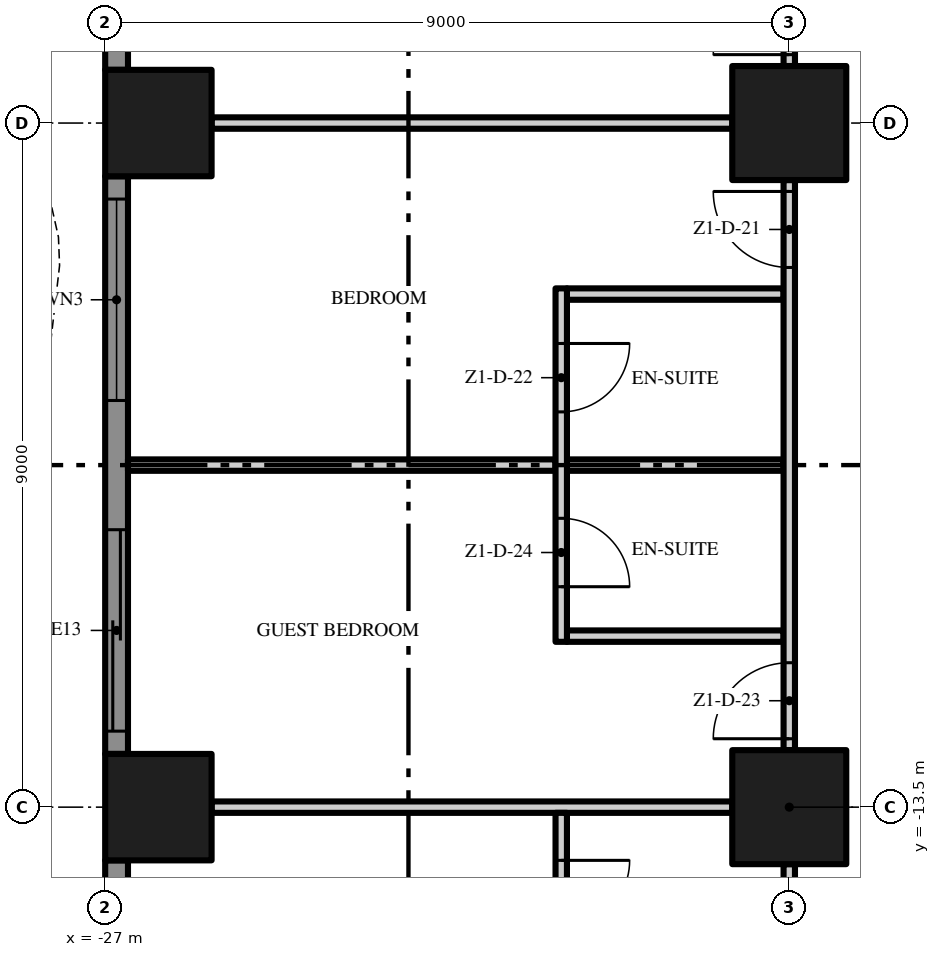
"""IFC4 building model, lengths in metres.
Left out: names, types, materials, properties, quantities, classifications, styles, units other than length and angle.
Written with IfcOpenShell. Run it as: python <this file> out.ifc"""

import sys

from ifc_helpers import new_model, si_unit, direction, frame, frame_2d, origin, origin_2d, place, context, subcontext, project, spatial, polyline, rectangle, outline, extrude, element, fill, save


model = new_model("IFC4")
c1 = context("Model", 3, precision=1e-05, world=origin(), true_north=direction((0.0, 1.0)))
c2 = subcontext(c1, "Body", "Model", "MODEL_VIEW")
j1 = project(units=[si_unit("LENGTHUNIT", "METRE"), si_unit("PLANEANGLEUNIT", "RADIAN")], contexts=[c1])
p1 = place(None, origin())
s1 = spatial("IfcSite", under=j1, at=p1, CompositionType="ELEMENT")
p2 = place(p1, origin())
s2 = spatial("IfcBuilding", under=s1, at=p2, CompositionType="ELEMENT")
p3 = place(p2, frame((0.0, 0.0, 49.2)))
s3 = spatial("IfcBuildingStorey", under=s2, at=p3, CompositionType="ELEMENT", Elevation=49.2)
for number, where, z_axis, x_axis in (
    (1, (-18.0, -13.5, 0.0), (0.0, 0.0, 1.0), (1.0, 0.0, 0.0)),
    (2, (-18.0, -4.5, 0.0), (0.0, 0.0, 1.0), (1.0, 0.0, 0.0)),
):
    element("IfcColumn", number, at=place(p3, frame(where, z_axis=z_axis, x_axis=x_axis)), inside=s3, PredefinedType="COLUMN", context=c2, shape_type="SweptSolid", body=[
        extrude(rectangle(XDim=1.5, YDim=1.5, at=origin_2d()), origin(), (0.0, 0.0, 1.0), 3.5),
    ])
for number, where, z_axis, x_axis in (
    (3, (-26.3, -13.5, 0.0), (0.0, 0.0, 1.0), (1.0, 0.0, 0.0)),
    (4, (-26.3, -4.5, 0.0), (0.0, 0.0, 1.0), (1.0, 0.0, 0.0)),
):
    element("IfcColumn", number, at=place(p3, frame(where, z_axis=z_axis, x_axis=x_axis)), inside=s3, PredefinedType="COLUMN", context=c2, shape_type="SweptSolid", body=[
        extrude(rectangle(XDim=1.4, YDim=1.4, at=origin_2d()), origin(), (0.0, 0.0, 1.0), 3.5),
    ])
p4 = place(p3, frame((-26.85, -3.8, 0.0), z_axis=(0.0, 0.0, 1.0), x_axis=(0.0, 1.0, 0.0)))
e5 = element("IfcWall", 5, at=p4, inside=s3, PredefinedType="SOLIDWALL", context=c2, shape_type="SweptSolid", body=[
    extrude(rectangle(XDim=7.6, YDim=0.3, at=frame_2d((3.8, 0.0))), origin(), (0.0, 0.0, 1.0), 3.5),
])
p5 = place(p4, frame((4.65, 0.0, 0.0)))
e6 = element("IfcOpeningElement", 6, at=p5, cuts=e5, PredefinedType="OPENING", context=c2, shape_type="SweptSolid", body=[
    extrude(rectangle(XDim=2.65, YDim=2.4, at=frame_2d((1.325, 1.2))), frame((0.0, 0.16, 0.0), z_axis=(0.0, -1.0, 0.0), x_axis=(1.0, 0.0, 0.0)), (0.0, 0.0, 1.0), 0.32),
])
p6 = place(p4, frame((0.3, 0.0, 0.45)))
e7 = element("IfcOpeningElement", 7, at=p6, cuts=e5, PredefinedType="OPENING", context=c2, shape_type="SweptSolid", body=[
    extrude(rectangle(XDim=2.65, YDim=2.65, at=frame_2d((1.325, 1.325))), frame((0.0, 0.16, 0.0), z_axis=(0.0, -1.0, 0.0), x_axis=(1.0, 0.0, 0.0)), (0.0, 0.0, 1.0), 0.32),
])
p7 = place(p3, frame((-26.85, -12.8, 0.0), z_axis=(0.0, 0.0, 1.0), x_axis=(0.0, 1.0, 0.0)))
e8 = element("IfcWall", 8, at=p7, inside=s3, PredefinedType="SOLIDWALL", context=c2, shape_type="SweptSolid", body=[
    extrude(rectangle(XDim=7.6, YDim=0.3, at=frame_2d((3.8, 0.0))), origin(), (0.0, 0.0, 1.0), 3.5),
])
p8 = place(p7, frame((4.65, 0.0, 0.45)))
e9 = element("IfcOpeningElement", 9, at=p8, cuts=e8, PredefinedType="OPENING", context=c2, shape_type="SweptSolid", body=[
    extrude(rectangle(XDim=2.65, YDim=2.65, at=frame_2d((1.325, 1.325))), frame((0.0, 0.16, 0.0), z_axis=(0.0, -1.0, 0.0), x_axis=(1.0, 0.0, 0.0)), (0.0, 0.0, 1.0), 0.32),
])
p9 = place(p7, frame((0.3, 0.0, 0.0)))
e10 = element("IfcOpeningElement", 10, at=p9, cuts=e8, PredefinedType="OPENING", context=c2, shape_type="SweptSolid", body=[
    extrude(rectangle(XDim=2.65, YDim=2.4, at=frame_2d((1.325, 1.2))), frame((0.0, 0.16, 0.0), z_axis=(0.0, -1.0, 0.0), x_axis=(1.0, 0.0, 0.0)), (0.0, 0.0, 1.0), 0.32),
])
p10 = place(p3, frame((-26.85, -18.0, 0.0), z_axis=(0.0, 0.0, 1.0), x_axis=(0.0, 1.0, 0.0)))
e11 = element("IfcWall", 11, at=p10, inside=s3, PredefinedType="SOLIDWALL", context=c2, shape_type="SweptSolid", body=[
    extrude(rectangle(XDim=3.8, YDim=0.3, at=frame_2d((1.9, 0.0))), origin(), (0.0, 0.0, 1.0), 3.5),
])
p11 = place(p10, frame((0.85, 0.0, 0.0)))
e12 = element("IfcOpeningElement", 12, at=p11, cuts=e11, PredefinedType="OPENING", context=c2, shape_type="SweptSolid", body=[
    extrude(rectangle(XDim=2.65, YDim=2.4, at=frame_2d((1.325, 1.2))), frame((0.0, 0.16, 0.0), z_axis=(0.0, -1.0, 0.0), x_axis=(1.0, 0.0, 0.0)), (0.0, 0.0, 1.0), 0.32),
])
p12 = place(p3, origin())
e13 = element("IfcWall", 13, at=p12, inside=s3, PredefinedType="USERDEFINED", context=c2, shape_type="SweptSolid", body=[
    extrude(outline(polyline([(-29.649, 18.0), (-29.985, 16.5), (-30.0, 16.125), (-29.869, 15.0), (-29.345, 13.5), (-28.612, 12.0), (-27.951, 10.5), (-27.615, 9.0), (-27.6, 8.625), (-27.731, 7.5), (-28.255, 6.0), (-28.988, 4.5), (-29.649, 3.0), (-29.985, 1.5), (-30.0, 1.125), (-29.869, 0.0), (-29.345, -1.5), (-28.612, -3.0), (-27.951, -4.5), (-27.615, -6.0), (-27.6, -6.375), (-27.731, -7.5), (-28.255, -9.0), (-28.988, -10.5), (-29.649, -12.0), (-29.985, -13.5), (-30.0, -13.875), (-29.869, -15.0), (-29.345, -16.5), (-28.612, -18.0), (-28.388, -17.89), (-29.114, -16.404), (-29.624, -14.944), (-29.749, -13.865), (-29.736, -13.533), (-29.41, -12.079), (-28.761, -10.605), (-28.024, -9.096), (-27.486, -7.556), (-27.349, -6.385), (-27.366, -5.967), (-27.713, -4.421), (-28.385, -2.895), (-29.114, -1.404), (-29.624, 0.056), (-29.749, 1.135), (-29.736, 1.467), (-29.41, 2.921), (-28.761, 4.395), (-28.024, 5.904), (-27.486, 7.444), (-27.349, 8.615), (-27.366, 9.033), (-27.713, 10.579), (-28.385, 12.105), (-29.114, 13.596), (-29.624, 15.056), (-29.749, 16.135), (-29.736, 16.467), (-29.405, 17.945), (-29.649, 18.0)])), origin(), (0.0, 0.0, 1.0), 0.9),
])
p13 = place(p3, frame((-25.6, -13.5, 0.0), z_axis=(0.0, 0.0, 1.0), x_axis=(1.0, 0.0, 0.0)))
e14 = element("IfcWall", 14, at=p13, inside=s3, PredefinedType="PARTITIONING", context=c2, shape_type="SweptSolid", body=[
    extrude(rectangle(XDim=6.85, YDim=0.15, at=frame_2d((3.425, 0.0))), origin(), (0.0, 0.0, 1.0), 3.5),
])
p14 = place(p3, frame((-20.925, -11.25, 0.0), z_axis=(0.0, 0.0, 1.0), x_axis=(1.0, 0.0, 0.0)))
e15 = element("IfcWall", 15, at=p14, inside=s3, PredefinedType="PARTITIONING", context=c2, shape_type="SweptSolid", body=[
    extrude(rectangle(XDim=2.85, YDim=0.15, at=frame_2d((1.425, 0.0))), origin(), (0.0, 0.0, 1.0), 3.5),
])
p15 = place(p3, frame((-26.7, -9.0, 0.0), z_axis=(0.0, 0.0, 1.0), x_axis=(1.0, 0.0, 0.0)))
e16 = element("IfcWall", 16, at=p15, inside=s3, PredefinedType="PARTITIONING", context=c2, shape_type="SweptSolid", body=[
    extrude(rectangle(XDim=5.625, YDim=0.15, at=frame_2d((2.812, 0.0))), origin(), (0.0, 0.0, 1.0), 3.5),
])
for number, where, z_axis, x_axis in (
    (17, (-20.925, -9.0, 0.0), (0.0, 0.0, 1.0), (1.0, 0.0, 0.0)),
    (18, (-20.925, -6.75, 0.0), (0.0, 0.0, 1.0), (1.0, 0.0, 0.0)),
):
    element("IfcWall", number, at=place(p3, frame(where, z_axis=z_axis, x_axis=x_axis)), inside=s3, PredefinedType="PARTITIONING", context=c2, shape_type="SweptSolid", body=[
        extrude(rectangle(XDim=2.85, YDim=0.15, at=frame_2d((1.425, 0.0))), origin(), (0.0, 0.0, 1.0), 3.5),
    ])
p16 = place(p3, frame((-25.6, -4.5, 0.0), z_axis=(0.0, 0.0, 1.0), x_axis=(1.0, 0.0, 0.0)))
e19 = element("IfcWall", 19, at=p16, inside=s3, PredefinedType="PARTITIONING", context=c2, shape_type="SweptSolid", body=[
    extrude(rectangle(XDim=6.85, YDim=0.15, at=frame_2d((3.425, 0.0))), origin(), (0.0, 0.0, 1.0), 3.5),
])
p17 = place(p3, frame((-21.0, -13.575, 0.0), z_axis=(0.0, 0.0, 1.0), x_axis=(0.0, -1.0, 0.0)))
e20 = element("IfcWall", 20, at=p17, inside=s3, PredefinedType="PARTITIONING", context=c2, shape_type="SweptSolid", body=[
    extrude(rectangle(XDim=2.25, YDim=0.15, at=frame_2d((1.125, 0.0))), origin(), (0.0, 0.0, 1.0), 3.5),
])
p18 = place(p17, frame((0.625, 0.0, 0.0)))
e21 = element("IfcOpeningElement", 21, at=p18, cuts=e20, PredefinedType="OPENING", context=c2, shape_type="SweptSolid", body=[
    extrude(rectangle(XDim=0.9, YDim=2.1, at=frame_2d((0.45, 1.05))), frame((0.0, 0.085, 0.0), z_axis=(0.0, -1.0, 0.0), x_axis=(1.0, 0.0, 0.0)), (0.0, 0.0, 1.0), 0.17),
])
p19 = place(p3, frame((-21.0, -6.675, 0.0), z_axis=(0.0, 0.0, 1.0), x_axis=(0.0, -1.0, 0.0)))
e22 = element("IfcWall", 22, at=p19, inside=s3, PredefinedType="PARTITIONING", context=c2, shape_type="SweptSolid", body=[
    extrude(rectangle(XDim=4.65, YDim=0.15, at=frame_2d((2.325, 0.0))), origin(), (0.0, 0.0, 1.0), 3.5),
])
p20 = place(p19, frame((0.725, 0.0, 0.0)))
e23 = element("IfcOpeningElement", 23, at=p20, cuts=e22, PredefinedType="OPENING", context=c2, shape_type="SweptSolid", body=[
    extrude(rectangle(XDim=0.9, YDim=2.1, at=frame_2d((0.45, 1.05))), frame((0.0, 0.085, 0.0), z_axis=(0.0, -1.0, 0.0), x_axis=(1.0, 0.0, 0.0)), (0.0, 0.0, 1.0), 0.17),
])
p21 = place(p19, frame((3.025, 0.0, 0.0)))
e24 = element("IfcOpeningElement", 24, at=p21, cuts=e22, PredefinedType="OPENING", context=c2, shape_type="SweptSolid", body=[
    extrude(rectangle(XDim=0.9, YDim=2.1, at=frame_2d((0.45, 1.05))), frame((0.0, 0.085, 0.0), z_axis=(0.0, -1.0, 0.0), x_axis=(1.0, 0.0, 0.0)), (0.0, 0.0, 1.0), 0.17),
])
p22 = place(p3, frame((-18.0, -21.1, 0.0), z_axis=(0.0, 0.0, 1.0), x_axis=(0.0, 1.0, 0.0)))
e25 = element("IfcWall", 25, at=p22, inside=s3, PredefinedType="PARTITIONING", context=c2, shape_type="SweptSolid", body=[
    extrude(rectangle(XDim=6.85, YDim=0.15, at=frame_2d((3.425, 0.0))), origin(), (0.0, 0.0, 1.0), 3.5),
])
p23 = place(p22, frame((1.1, 0.0, 0.0)))
e26 = element("IfcOpeningElement", 26, at=p23, cuts=e25, PredefinedType="OPENING", context=c2, shape_type="SweptSolid", body=[
    extrude(rectangle(XDim=1.8, YDim=2.4, at=frame_2d((0.9, 1.2))), frame((0.0, 0.085, 0.0), z_axis=(0.0, -1.0, 0.0), x_axis=(1.0, 0.0, 0.0)), (0.0, 0.0, 1.0), 0.17),
])
p24 = place(p3, frame((-18.0, -12.75, 0.0), z_axis=(0.0, 0.0, 1.0), x_axis=(0.0, 1.0, 0.0)))
e27 = element("IfcWall", 27, at=p24, inside=s3, PredefinedType="PARTITIONING", context=c2, shape_type="SweptSolid", body=[
    extrude(rectangle(XDim=7.5, YDim=0.15, at=frame_2d((3.75, 0.0))), origin(), (0.0, 0.0, 1.0), 3.5),
])
p25 = place(p24, frame((6.35, 0.0, 0.0)))
e28 = element("IfcOpeningElement", 28, at=p25, cuts=e27, PredefinedType="OPENING", context=c2, shape_type="SweptSolid", body=[
    extrude(rectangle(XDim=1.0, YDim=2.4, at=frame_2d((0.5, 1.2))), frame((0.0, 0.085, 0.0), z_axis=(0.0, -1.0, 0.0), x_axis=(1.0, 0.0, 0.0)), (0.0, 0.0, 1.0), 0.17),
])
p26 = place(p24, frame((0.15, 0.0, 0.0)))
e29 = element("IfcOpeningElement", 29, at=p26, cuts=e27, PredefinedType="OPENING", context=c2, shape_type="SweptSolid", body=[
    extrude(rectangle(XDim=1.0, YDim=2.4, at=frame_2d((0.5, 1.2))), frame((0.0, 0.085, 0.0), z_axis=(0.0, -1.0, 0.0), x_axis=(1.0, 0.0, 0.0)), (0.0, 0.0, 1.0), 0.17),
])
p27 = place(p3, frame((-18.0, -3.75, 0.0), z_axis=(0.0, 0.0, 1.0), x_axis=(0.0, 1.0, 0.0)))
e30 = element("IfcWall", 30, at=p27, inside=s3, PredefinedType="PARTITIONING", context=c2, shape_type="SweptSolid", body=[
    extrude(rectangle(XDim=3.65, YDim=0.15, at=frame_2d((1.825, 0.0))), origin(), (0.0, 0.0, 1.0), 3.5),
])
p28 = place(p27, frame((0.15, 0.0, 0.0)))
e31 = element("IfcOpeningElement", 31, at=p28, cuts=e30, PredefinedType="OPENING", context=c2, shape_type="SweptSolid", body=[
    extrude(rectangle(XDim=1.0, YDim=2.4, at=frame_2d((0.5, 1.2))), frame((0.0, 0.085, 0.0), z_axis=(0.0, -1.0, 0.0), x_axis=(1.0, 0.0, 0.0)), (0.0, 0.0, 1.0), 0.17),
])
p29 = place(p8, origin())
e32 = element("IfcWindow", 32, at=p29, inside=s3, PartitioningType="SINGLE_PANEL", PredefinedType="WINDOW", context=c2, shape_type="SweptSolid", body=[
    extrude(rectangle(XDim=2.65, YDim=2.65, at=frame_2d((1.325, 1.325))), frame((0.0, 0.03, 0.0), z_axis=(0.0, -1.0, 0.0), x_axis=(1.0, 0.0, 0.0)), (0.0, 0.0, 1.0), 0.06),
])
fill(e9, e32)
p30 = place(p9, origin())
e33 = element("IfcDoor", 33, at=p30, inside=s3, OperationType="SINGLE_SWING_LEFT", PredefinedType="DOOR", context=c2, shape_type="SweptSolid", body=[
    extrude(rectangle(XDim=2.65, YDim=2.4, at=frame_2d((1.325, 1.2))), frame((0.0, 0.025, 0.0), z_axis=(0.0, -1.0, 0.0), x_axis=(1.0, 0.0, 0.0)), (0.0, 0.0, 1.0), 0.05),
])
fill(e10, e33)
p31 = place(p28, origin())
e34 = element("IfcDoor", 34, at=p31, inside=s3, OperationType="SINGLE_SWING_LEFT", PredefinedType="DOOR", context=c2, shape_type="SweptSolid", body=[
    extrude(rectangle(XDim=1.0, YDim=2.4, at=frame_2d((0.5, 1.2))), frame((0.0, 0.025, 0.0), z_axis=(0.0, -1.0, 0.0), x_axis=(1.0, 0.0, 0.0)), (0.0, 0.0, 1.0), 0.05),
])
fill(e31, e34)
p32 = place(p25, origin())
e35 = element("IfcDoor", 35, at=p32, inside=s3, OperationType="SINGLE_SWING_RIGHT", PredefinedType="DOOR", context=c2, shape_type="SweptSolid", body=[
    extrude(rectangle(XDim=1.0, YDim=2.4, at=frame_2d((0.5, 1.2))), frame((0.0, 0.025, 0.0), z_axis=(0.0, -1.0, 0.0), x_axis=(1.0, 0.0, 0.0)), (0.0, 0.0, 1.0), 0.05),
])
fill(e28, e35)
p33 = place(p20, origin())
e36 = element("IfcDoor", 36, at=p33, inside=s3, OperationType="SINGLE_SWING_LEFT", PredefinedType="DOOR", context=c2, shape_type="SweptSolid", body=[
    extrude(rectangle(XDim=0.9, YDim=2.1, at=frame_2d((0.45, 1.05))), frame((0.0, 0.025, 0.0), z_axis=(0.0, -1.0, 0.0), x_axis=(1.0, 0.0, 0.0)), (0.0, 0.0, 1.0), 0.05),
])
fill(e23, e36)
p34 = place(p26, origin())
e37 = element("IfcDoor", 37, at=p34, inside=s3, OperationType="SINGLE_SWING_LEFT", PredefinedType="DOOR", context=c2, shape_type="SweptSolid", body=[
    extrude(rectangle(XDim=1.0, YDim=2.4, at=frame_2d((0.5, 1.2))), frame((0.0, 0.025, 0.0), z_axis=(0.0, -1.0, 0.0), x_axis=(1.0, 0.0, 0.0)), (0.0, 0.0, 1.0), 0.05),
])
fill(e29, e37)
p35 = place(p21, origin())
e38 = element("IfcDoor", 38, at=p35, inside=s3, OperationType="SINGLE_SWING_RIGHT", PredefinedType="DOOR", context=c2, shape_type="SweptSolid", body=[
    extrude(rectangle(XDim=0.9, YDim=2.1, at=frame_2d((0.45, 1.05))), frame((0.0, 0.025, 0.0), z_axis=(0.0, -1.0, 0.0), x_axis=(1.0, 0.0, 0.0)), (0.0, 0.0, 1.0), 0.05),
])
fill(e24, e38)
p36 = place(p18, origin())
e39 = element("IfcDoor", 39, at=p36, inside=s3, OperationType="SINGLE_SWING_LEFT", PredefinedType="DOOR", context=c2, shape_type="SweptSolid", body=[
    extrude(rectangle(XDim=0.9, YDim=2.1, at=frame_2d((0.45, 1.05))), frame((0.0, 0.025, 0.0), z_axis=(0.0, -1.0, 0.0), x_axis=(1.0, 0.0, 0.0)), (0.0, 0.0, 1.0), 0.05),
])
fill(e21, e39)
save(model, sys.argv[1])
